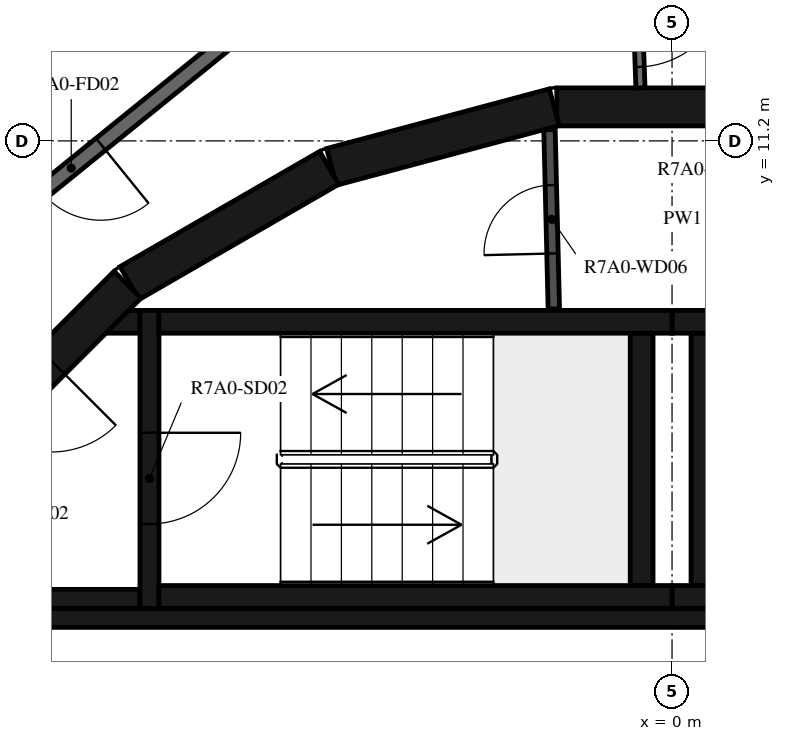
"""IFC4 building model, lengths in metres.
Left out: names, types, materials, properties, quantities, classifications, styles, units other than length and angle.
Written with IfcOpenShell. Run it as: python <this file> out.ifc"""

import sys

from ifc_helpers import new_model, si_unit, direction, frame, frame_2d, origin, place, context, subcontext, project, spatial, polyline, rectangle, outline, extrude, element, fill, save


model = new_model("IFC4")
c1 = context("Model", 3, precision=1e-05, world=origin(), true_north=direction((0.0, 1.0)))
c2 = subcontext(c1, "Body", "Model", "MODEL_VIEW")
j1 = project(units=[si_unit("LENGTHUNIT", "METRE"), si_unit("PLANEANGLEUNIT", "RADIAN")], contexts=[c1])
p1 = place(None, origin())
s1 = spatial("IfcSite", under=j1, at=p1, CompositionType="ELEMENT")
p2 = place(p1, origin())
s2 = spatial("IfcBuilding", under=s1, at=p2, CompositionType="ELEMENT")
p3 = place(p2, frame((0.0, 0.0, 270.4)))
s3 = spatial("IfcBuildingStorey", under=s2, at=p3, CompositionType="ELEMENT", Elevation=270.4)
for number, where, z_axis, x_axis in (
    (1, (1.516, 11.647, 0.0), (0.0, 0.0, 1.0), (-1.0, 0.0, 0.0)),
    (2, (-1.55, 11.643, 0.0), (0.0, 0.0, 1.0), (-0.966, -0.259, 0.0)),
    (3, (-4.51, 10.845, 0.0), (0.0, 0.0, 1.0), (-0.866, -0.5, 0.0)),
):
    element("IfcWall", number, at=place(p3, frame(where, z_axis=z_axis, x_axis=x_axis)), inside=s3, PredefinedType="SHEAR", context=c2, shape_type="SweptSolid", body=[
        extrude(rectangle(XDim=3.033, YDim=0.5, at=frame_2d((1.516, 0.0))), origin(), (0.0, 0.0, 1.0), 3.12),
    ])
p4 = place(p3, frame((-7.164, 9.308, 0.0), z_axis=(0.0, 0.0, 1.0), x_axis=(-0.707106781187, -0.707106781187, 0.0)))
e4 = element("IfcWall", 4, at=p4, inside=s3, PredefinedType="SHEAR", context=c2, shape_type="SweptSolid", body=[
    extrude(rectangle(XDim=3.032, YDim=0.5, at=frame_2d((1.516, 0.0))), origin(), (0.0, 0.0, 1.0), 3.12),
])
p5 = place(p4, frame((1.416, 0.0, 0.0)))
e5 = element("IfcOpeningElement", 5, at=p5, cuts=e4, PredefinedType="OPENING", context=c2, shape_type="SweptSolid", body=[
    extrude(rectangle(XDim=1.2, YDim=2.1, at=frame_2d((0.6, 1.05))), frame((0.0, 0.26, 0.0), z_axis=(0.0, -1.0, 0.0), x_axis=(1.0, 0.0, 0.0)), (0.0, 0.0, 1.0), 0.52),
])
for number, where, z_axis, x_axis in (
    (6, (0.0, 5.2, 0.0), (0.0, 0.0, 1.0), (1.0, 0.0, 0.0)),
    (7, (0.0, 8.82, 0.0), (0.0, 0.0, 1.0), (1.0, 0.0, 0.0)),
):
    element("IfcWall", number, at=place(p3, frame(where, z_axis=z_axis, x_axis=x_axis)), inside=s3, PredefinedType="SHEAR", context=c2, shape_type="SweptSolid", body=[
        extrude(rectangle(XDim=6.75, YDim=0.3, at=frame_2d((3.375, 0.0))), origin(), (0.0, 0.0, 1.0), 3.12),
    ])
p6 = place(p3, frame((0.4, 5.35, 0.0), z_axis=(0.0, 0.0, 1.0), x_axis=(0.0, 1.0, 0.0)))
e8 = element("IfcWall", 8, at=p6, inside=s3, PredefinedType="SHEAR", context=c2, shape_type="SweptSolid", body=[
    extrude(rectangle(XDim=3.32, YDim=0.3, at=frame_2d((1.66, 0.0))), origin(), (0.0, 0.0, 1.0), 3.12),
])
for number, where, z_axis, x_axis in (
    (9, (-6.75, 5.2, 0.0), (0.0, 0.0, 1.0), (1.0, 0.0, 0.0)),
    (10, (-6.75, 8.82, 0.0), (0.0, 0.0, 1.0), (1.0, 0.0, 0.0)),
):
    element("IfcWall", number, at=place(p3, frame(where, z_axis=z_axis, x_axis=x_axis)), inside=s3, PredefinedType="SHEAR", context=c2, shape_type="SweptSolid", body=[
        extrude(rectangle(XDim=6.75, YDim=0.3, at=frame_2d((3.375, 0.0))), origin(), (0.0, 0.0, 1.0), 3.12),
    ])
p7 = place(p3, frame((-0.4, 5.35, 0.0), z_axis=(0.0, 0.0, 1.0), x_axis=(0.0, 1.0, 0.0)))
e11 = element("IfcWall", 11, at=p7, inside=s3, PredefinedType="SHEAR", context=c2, shape_type="SweptSolid", body=[
    extrude(rectangle(XDim=3.32, YDim=0.3, at=frame_2d((1.66, 0.0))), origin(), (0.0, 0.0, 1.0), 3.12),
])
p8 = place(p3, frame((-6.875, 8.97, 0.0), z_axis=(0.0, 0.0, 1.0), x_axis=(0.0, -1.0, 0.0)))
e12 = element("IfcWall", 12, at=p8, inside=s3, PredefinedType="SHEAR", context=c2, shape_type="SweptSolid", body=[
    extrude(rectangle(XDim=3.92, YDim=0.25, at=frame_2d((1.96, 0.0))), origin(), (0.0, 0.0, 1.0), 3.12),
])
p9 = place(p8, frame((1.61, 0.0, 0.0)))
e13 = element("IfcOpeningElement", 13, at=p9, cuts=e12, PredefinedType="OPENING", context=c2, shape_type="SweptSolid", body=[
    extrude(rectangle(XDim=1.2, YDim=2.1, at=frame_2d((0.6, 1.05))), frame((0.0, 0.135, 0.0), z_axis=(0.0, -1.0, 0.0), x_axis=(1.0, 0.0, 0.0)), (0.0, 0.0, 1.0), 0.27),
])
p10 = place(p3, frame((-7.0, 5.175, 0.0), z_axis=(0.0, 0.0, 1.0), x_axis=(-1.0, 0.0, 0.0)))
e14 = element("IfcWall", 14, at=p10, inside=s3, PredefinedType="SHEAR", context=c2, shape_type="SweptSolid", body=[
    extrude(rectangle(XDim=3.1, YDim=0.25, at=frame_2d((1.55, 0.0))), origin(), (0.0, 0.0, 1.0), 3.12),
])
p11 = place(p3, origin())
e15 = element("IfcWall", 15, at=p11, inside=s3, PredefinedType="SHEAR", context=c2, shape_type="SweptSolid", body=[
    extrude(outline(polyline([(-7.148, 8.97), (-7.0, 8.97), (-7.0, 8.67), (-7.448, 8.67), (-7.148, 8.97)])), origin(), (0.0, 0.0, 1.0), 3.12),
])
p12 = place(p3, origin())
e16 = element("IfcWall", 16, at=p12, inside=s3, PredefinedType="SHEAR", context=c2, shape_type="SweptSolid", body=[
    extrude(outline(polyline([(-9.8, 1.9), (-9.55, 1.9), (-9.55, 4.8), (3.1, 4.8), (3.1, 1.9), (3.35, 1.9), (3.35, 4.8), (5.25, 4.8), (5.25, 1.9), (5.5, 1.9), (5.5, 4.8), (7.4, 4.8), (7.4, 1.9), (7.65, 1.9), (7.65, 4.8), (9.55, 4.8), (9.55, 1.9), (9.8, 1.9), (9.8, 4.8), (9.8, 5.05), (-9.8, 5.05), (-9.8, 4.8), (-9.8, 1.9)])), origin(), (0.0, 0.0, 1.0), 3.12),
])
p13 = place(p3, frame((-1.555, 8.99, 0.0), z_axis=(0.0, 0.0, 1.0), x_axis=(-0.024125549686, 0.999708936567, 0.0)))
e17 = element("IfcWall", 17, at=p13, inside=s3, PredefinedType="PARTITIONING", context=c2, shape_type="SweptSolid", body=[
    extrude(rectangle(XDim=2.358, YDim=0.15, at=frame_2d((1.179, 0.0))), origin(), (0.0, 0.0, 1.0), 3.12),
])
p14 = place(p13, frame((0.729, 0.0, 0.0)))
e18 = element("IfcOpeningElement", 18, at=p14, cuts=e17, PredefinedType="OPENING", context=c2, shape_type="SweptSolid", body=[
    extrude(rectangle(XDim=0.9, YDim=2.1, at=frame_2d((0.45, 1.05))), frame((0.0, 0.085, 0.0), z_axis=(0.0, -1.0, 0.0), x_axis=(1.0, 0.0, 0.0)), (0.0, 0.0, 1.0), 0.17),
])
p15 = place(p3, frame((-0.471, 13.492, 0.0), z_axis=(0.0, 0.0, 1.0), x_axis=(0.034873173869, -0.999391745886, 0.0)))
e19 = element("IfcWall", 19, at=p15, inside=s3, PredefinedType="PARTITIONING", context=c2, shape_type="SweptSolid", body=[
    extrude(rectangle(XDim=1.596, YDim=0.12, at=frame_2d((0.798, 0.0))), origin(), (0.0, 0.0, 1.0), 3.12),
])
p16 = place(p15, frame((0.12, 0.0, 0.0)))
e20 = element("IfcOpeningElement", 20, at=p16, cuts=e19, PredefinedType="OPENING", context=c2, shape_type="SweptSolid", body=[
    extrude(rectangle(XDim=1.2, YDim=2.1, at=frame_2d((0.6, 1.05))), frame((0.0, 0.07, 0.0), z_axis=(0.0, -1.0, 0.0), x_axis=(1.0, 0.0, 0.0)), (0.0, 0.0, 1.0), 0.14),
])
p17 = place(p3, frame((-5.643, 12.673, 0.0), z_axis=(0.0, 0.0, 1.0), x_axis=(-0.777160148113, -0.629302871585, 0.0)))
e21 = element("IfcWall", 21, at=p17, inside=s3, PredefinedType="STANDARD", context=c2, shape_type="SweptSolid", body=[
    extrude(rectangle(XDim=7.181, YDim=0.2, at=frame_2d((3.59, 0.0))), origin(), (0.0, 0.0, 1.0), 3.12),
])
p18 = place(p17, frame((2.41, 0.0, 0.0)))
e22 = element("IfcOpeningElement", 22, at=p18, cuts=e21, PredefinedType="OPENING", context=c2, shape_type="SweptSolid", body=[
    extrude(rectangle(XDim=1.0, YDim=2.1, at=frame_2d((0.5, 1.05))), frame((0.0, 0.11, 0.0), z_axis=(0.0, -1.0, 0.0), x_axis=(1.0, 0.0, 0.0)), (0.0, 0.0, 1.0), 0.22),
])
p19 = place(p17, frame((5.112, 0.0, 0.0)))
e23 = element("IfcOpeningElement", 23, at=p19, cuts=e21, PredefinedType="OPENING", context=c2, shape_type="SweptSolid", body=[
    extrude(rectangle(XDim=1.0, YDim=2.1, at=frame_2d((0.5, 1.05))), frame((0.0, 0.11, 0.0), z_axis=(0.0, -1.0, 0.0), x_axis=(1.0, 0.0, 0.0)), (0.0, 0.0, 1.0), 0.22),
])
p20 = place(p9, origin())
e24 = element("IfcDoor", 24, at=p20, inside=s3, OperationType="SINGLE_SWING_LEFT", PredefinedType="DOOR", context=c2, shape_type="SweptSolid", body=[
    extrude(rectangle(XDim=1.2, YDim=2.1, at=frame_2d((0.6, 1.05))), frame((0.0, 0.025, 0.0), z_axis=(0.0, -1.0, 0.0), x_axis=(1.0, 0.0, 0.0)), (0.0, 0.0, 1.0), 0.05),
])
fill(e13, e24)
p21 = place(p5, origin())
e25 = element("IfcDoor", 25, at=p21, inside=s3, OperationType="SINGLE_SWING_RIGHT", PredefinedType="DOOR", context=c2, shape_type="SweptSolid", body=[
    extrude(rectangle(XDim=1.2, YDim=2.1, at=frame_2d((0.6, 1.05))), frame((0.0, 0.025, 0.0), z_axis=(0.0, -1.0, 0.0), x_axis=(1.0, 0.0, 0.0)), (0.0, 0.0, 1.0), 0.05),
])
fill(e5, e25)
p22 = place(p14, origin())
e26 = element("IfcDoor", 26, at=p22, inside=s3, OperationType="SINGLE_SWING_RIGHT", PredefinedType="DOOR", context=c2, shape_type="SweptSolid", body=[
    extrude(rectangle(XDim=0.9, YDim=2.1, at=frame_2d((0.45, 1.05))), frame((0.0, 0.025, 0.0), z_axis=(0.0, -1.0, 0.0), x_axis=(1.0, 0.0, 0.0)), (0.0, 0.0, 1.0), 0.05),
])
fill(e18, e26)
p23 = place(p18, origin())
e27 = element("IfcDoor", 27, at=p23, inside=s3, OperationType="SINGLE_SWING_RIGHT", PredefinedType="DOOR", context=c2, shape_type="SweptSolid", body=[
    extrude(rectangle(XDim=1.0, YDim=2.1, at=frame_2d((0.5, 1.05))), frame((0.0, 0.025, 0.0), z_axis=(0.0, -1.0, 0.0), x_axis=(1.0, 0.0, 0.0)), (0.0, 0.0, 1.0), 0.05),
])
fill(e22, e27)
p24 = place(p16, origin())
e28 = element("IfcDoor", 28, at=p24, inside=s3, OperationType="DOUBLE_DOOR_SINGLE_SWING", PredefinedType="DOOR", context=c2, shape_type="SweptSolid", body=[
    extrude(rectangle(XDim=1.2, YDim=2.1, at=frame_2d((0.6, 1.05))), frame((0.0, 0.025, 0.0), z_axis=(0.0, -1.0, 0.0), x_axis=(1.0, 0.0, 0.0)), (0.0, 0.0, 1.0), 0.05),
])
fill(e20, e28)
save(model, sys.argv[1])
